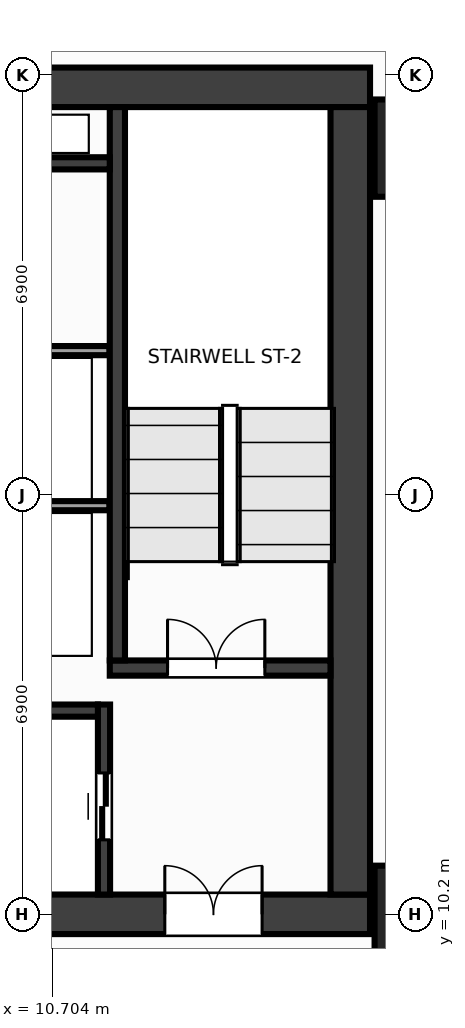
"""IFC4 building model, lengths in metres.
Left out: names, types, materials, properties, quantities, classifications, styles, units other than length and angle.
Written with IfcOpenShell. Run it as: python <this file> out.ifc"""

import sys

from ifc_helpers import new_model, si_unit, direction, frame, frame_2d, origin, origin_2d, place, context, subcontext, project, spatial, rectangle, extrude, source, transform, mapped, element, fill, save


model = new_model("IFC4")
c1 = context("Model", 3, precision=1e-05, world=origin(), true_north=direction((0.0, 1.0)))
c2 = subcontext(c1, "Body", "Model", "MODEL_VIEW")
j1 = project(units=[si_unit("LENGTHUNIT", "METRE"), si_unit("PLANEANGLEUNIT", "RADIAN")], contexts=[c1])
p1 = place(None, origin())
s1 = spatial("IfcSite", under=j1, at=p1, CompositionType="ELEMENT")
p2 = place(p1, origin())
s2 = spatial("IfcBuilding", under=s1, at=p2, CompositionType="ELEMENT")
p3 = place(p2, frame((0.0, 0.0, 142.4)))
s3 = spatial("IfcBuildingStorey", under=s2, at=p3, CompositionType="ELEMENT", Elevation=142.4)
m1 = source(origin(), c2, "Body", "SweptSolid", [
    extrude(rectangle(XDim=31.85, YDim=0.65, at=frame_2d((15.925, 0.0))), origin(), (0.0, 0.0, 1.0), 3.6),
])
p4 = place(p3, frame((-15.925, 23.8, 0.0), z_axis=(0.0, 0.0, 1.0), x_axis=(1.0, 0.0, 0.0)))
e1 = element("IfcWall", 1, at=p4, inside=s3, PredefinedType="SHEAR", context=c2, shape_type="MappedRepresentation", body=[
    mapped(m1, transform((0.0, 0.0, 0.0), x_axis=(1.0, 0.0, 0.0), y_axis=(0.0, 1.0, 0.0), z_axis=(0.0, 0.0, 1.0), scale=1.0)),
])
p5 = place(p3, frame((-15.925, 10.2, 0.0), z_axis=(0.0, 0.0, 1.0), x_axis=(1.0, 0.0, 0.0)))
e2 = element("IfcWall", 2, at=p5, inside=s3, PredefinedType="SHEAR", context=c2, shape_type="MappedRepresentation", body=[
    mapped(m1, transform((0.0, 0.0, 0.0), x_axis=(1.0, 0.0, 0.0), y_axis=(0.0, 1.0, 0.0), z_axis=(0.0, 0.0, 1.0), scale=1.0)),
])
p6 = place(p5, frame((1.775, 0.0, 0.0)))
e3 = element("IfcOpeningElement", 3, at=p6, cuts=e2, PredefinedType="OPENING", context=c2, shape_type="SweptSolid", body=[
    extrude(rectangle(XDim=1.6, YDim=2.15, at=frame_2d((0.8, 1.075))), frame((0.0, 0.337, 0.0), z_axis=(0.0, -1.0, 0.0), x_axis=(1.0, 0.0, 0.0)), (0.0, 0.0, 1.0), 0.674),
])
p7 = place(p5, frame((28.475, 0.0, 0.0)))
e4 = element("IfcOpeningElement", 4, at=p7, cuts=e2, PredefinedType="OPENING", context=c2, shape_type="SweptSolid", body=[
    extrude(rectangle(XDim=1.6, YDim=2.15, at=frame_2d((0.8, 1.075))), frame((0.0, 0.337, 0.0), z_axis=(0.0, -1.0, 0.0), x_axis=(1.0, 0.0, 0.0)), (0.0, 0.0, 1.0), 0.674),
])
p8 = place(p5, frame((15.175, 0.0, 0.0)))
e5 = element("IfcOpeningElement", 5, at=p8, cuts=e2, PredefinedType="OPENING", context=c2, shape_type="SweptSolid", body=[
    extrude(rectangle(XDim=1.5, YDim=2.2, at=frame_2d((0.75, 1.1))), frame((0.0, 0.337, 0.0), z_axis=(0.0, -1.0, 0.0), x_axis=(1.0, 0.0, 0.0)), (0.0, 0.0, 1.0), 0.674),
])
m2 = source(origin(), c2, "Body", "SweptSolid", [
    extrude(rectangle(XDim=12.95, YDim=0.65, at=frame_2d((6.475, 0.0))), origin(), (0.0, 0.0, 1.0), 3.6),
])
p9 = place(p3, frame((15.6, 10.525, 0.0), z_axis=(0.0, 0.0, 1.0), x_axis=(0.0, 1.0, 0.0)))
e6 = element("IfcWall", 6, at=p9, inside=s3, PredefinedType="SHEAR", context=c2, shape_type="MappedRepresentation", body=[
    mapped(m2, transform((0.0, 0.0, 0.0), x_axis=(1.0, 0.0, 0.0), y_axis=(0.0, 1.0, 0.0), z_axis=(0.0, 0.0, 1.0), scale=1.0)),
])
m3 = source(origin(), c2, "Body", "SweptSolid", [
    extrude(rectangle(XDim=3.63, YDim=0.25, at=frame_2d((1.815, 0.0))), origin(), (0.0, 0.0, 1.0), 3.6),
])
p10 = place(p3, frame((11.645, 14.25, 0.0), z_axis=(0.0, 0.0, 1.0), x_axis=(1.0, 0.0, 0.0)))
e7 = element("IfcWall", 7, at=p10, inside=s3, PredefinedType="SHEAR", context=c2, shape_type="MappedRepresentation", body=[
    mapped(m3, transform((0.0, 0.0, 0.0), x_axis=(1.0, 0.0, 0.0), y_axis=(0.0, 1.0, 0.0), z_axis=(0.0, 0.0, 1.0), scale=1.0)),
])
p11 = place(p10, frame((0.95, 0.0, 0.0)))
e8 = element("IfcOpeningElement", 8, at=p11, cuts=e7, PredefinedType="OPENING", context=c2, shape_type="SweptSolid", body=[
    extrude(rectangle(XDim=1.6, YDim=2.15, at=frame_2d((0.8, 1.075))), frame((0.0, 0.137, 0.0), z_axis=(0.0, -1.0, 0.0), x_axis=(1.0, 0.0, 0.0)), (0.0, 0.0, 1.0), 0.274),
])
m4 = source(origin(), c2, "Body", "SweptSolid", [
    extrude(rectangle(XDim=9.1, YDim=0.25, at=frame_2d((4.55, 0.0))), origin(), (0.0, 0.0, 1.0), 3.6),
])
p12 = place(p3, frame((11.77, 14.375, 0.0), z_axis=(0.0, 0.0, 1.0), x_axis=(0.0, 1.0, 0.0)))
e9 = element("IfcWall", 9, at=p12, inside=s3, PredefinedType="SHEAR", context=c2, shape_type="MappedRepresentation", body=[
    mapped(m4, transform((0.0, 0.0, 0.0), x_axis=(1.0, 0.0, 0.0), y_axis=(0.0, 1.0, 0.0), z_axis=(0.0, 0.0, 1.0), scale=1.0)),
])
m5 = source(origin(), c2, "Body", "SweptSolid", [
    extrude(rectangle(XDim=3.125, YDim=0.2, at=frame_2d((1.562, 0.0))), origin(), (0.0, 0.0, 1.0), 3.6),
])
p13 = place(p3, frame((11.55, 10.525, 0.0), z_axis=(0.0, 0.0, 1.0), x_axis=(0.0, 1.0, 0.0)))
e10 = element("IfcWall", 10, at=p13, inside=s3, PredefinedType="SHEAR", context=c2, shape_type="MappedRepresentation", body=[
    mapped(m5, transform((0.0, 0.0, 0.0), x_axis=(1.0, 0.0, 0.0), y_axis=(0.0, 1.0, 0.0), z_axis=(0.0, 0.0, 1.0), scale=1.0)),
])
p14 = place(p13, frame((0.9, 0.0, 0.0)))
e11 = element("IfcOpeningElement", 11, at=p14, cuts=e10, PredefinedType="OPENING", context=c2, shape_type="SweptSolid", body=[
    extrude(rectangle(XDim=1.1, YDim=2.15, at=frame_2d((0.55, 1.075))), frame((0.0, 0.112, 0.0), z_axis=(0.0, -1.0, 0.0), x_axis=(1.0, 0.0, 0.0)), (0.0, 0.0, 1.0), 0.224),
])
m6 = source(origin(), c2, "Body", "SweptSolid", [
    extrude(rectangle(XDim=2.825, YDim=0.2, at=frame_2d((1.413, 0.0))), origin(), (0.0, 0.0, 1.0), 3.6),
])
p15 = place(p3, frame((8.625, 13.55, 0.0), z_axis=(0.0, 0.0, 1.0), x_axis=(1.0, 0.0, 0.0)))
e12 = element("IfcWall", 12, at=p15, inside=s3, PredefinedType="SHEAR", context=c2, shape_type="MappedRepresentation", body=[
    mapped(m6, transform((0.0, 0.0, 0.0), x_axis=(1.0, 0.0, 0.0), y_axis=(0.0, 1.0, 0.0), z_axis=(0.0, 0.0, 1.0), scale=1.0)),
])
m7 = source(origin(), c2, "Body", "SweptSolid", [
    extrude(rectangle(XDim=3.02, YDim=0.2, at=frame_2d((1.51, 0.0))), origin(), (0.0, 0.0, 1.0), 3.6),
])
p16 = place(p3, frame((8.625, 22.55, 0.0), z_axis=(0.0, 0.0, 1.0), x_axis=(1.0, 0.0, 0.0)))
e13 = element("IfcWall", 13, at=p16, inside=s3, PredefinedType="SHEAR", context=c2, shape_type="MappedRepresentation", body=[
    mapped(m7, transform((0.0, 0.0, 0.0), x_axis=(1.0, 0.0, 0.0), y_axis=(0.0, 1.0, 0.0), z_axis=(0.0, 0.0, 1.0), scale=1.0)),
])
m8 = source(origin(), c2, "Body", "SweptSolid", [
    extrude(rectangle(XDim=1.6, YDim=1.6, at=origin_2d()), origin(), (0.0, 0.0, 1.0), 3.6),
])
for number, where, z_axis, x_axis in (
    (14, (16.8, 10.2, 0.0), (0.0, 0.0, 1.0), (1.0, 0.0, 0.0)),
    (15, (16.8, 22.8, 0.0), (0.0, 0.0, 1.0), (1.0, 0.0, 0.0)),
):
    element("IfcColumn", number, at=place(p3, frame(where, z_axis=z_axis, x_axis=x_axis)), inside=s3, PredefinedType="COLUMN", context=c2, shape_type="MappedRepresentation", body=[
        mapped(m8, transform((0.0, 0.0, 0.0), x_axis=(1.0, 0.0, 0.0), y_axis=(0.0, 1.0, 0.0), z_axis=(0.0, 0.0, 1.0), scale=1.0)),
    ])
m9 = source(origin(), c2, "Body", "SweptSolid", [
    extrude(rectangle(XDim=3.01, YDim=0.15, at=frame_2d((1.505, 0.0))), origin(), (0.0, 0.0, 1.0), 3.38),
])
for number, where, z_axis, x_axis in (
    (16, (8.63, 16.92, 0.0), (0.0, 0.0, 1.0), (1.0, 0.0, 0.0)),
    (17, (8.63, 19.47, 0.0), (0.0, 0.0, 1.0), (1.0, 0.0, 0.0)),
):
    element("IfcWall", number, at=place(p3, frame(where, z_axis=z_axis, x_axis=x_axis)), inside=s3, PredefinedType="PARTITIONING", context=c2, shape_type="MappedRepresentation", body=[
        mapped(m9, transform((0.0, 0.0, 0.0), x_axis=(1.0, 0.0, 0.0), y_axis=(0.0, 1.0, 0.0), z_axis=(0.0, 0.0, 1.0), scale=1.0)),
    ])
m10 = source(origin(), c2, "Body", "SweptSolid", [
    extrude(rectangle(XDim=1.6, YDim=2.15, at=frame_2d((0.8, 1.075))), frame((0.0, 0.025, 0.0), z_axis=(0.0, -1.0, 0.0), x_axis=(1.0, 0.0, 0.0)), (0.0, 0.0, 1.0), 0.05),
])
p17 = place(p11, origin())
e18 = element("IfcDoor", 18, at=p17, inside=s3, OperationType="DOUBLE_DOOR_SINGLE_SWING", PredefinedType="DOOR", context=c2, shape_type="MappedRepresentation", body=[
    mapped(m10, transform((0.0, 0.0, 0.0), x_axis=(1.0, 0.0, 0.0), y_axis=(0.0, 1.0, 0.0), z_axis=(0.0, 0.0, 1.0), scale=1.0)),
])
fill(e8, e18)
p18 = place(p7, origin())
e19 = element("IfcDoor", 19, at=p18, inside=s3, OperationType="DOUBLE_DOOR_SINGLE_SWING", PredefinedType="DOOR", context=c2, shape_type="MappedRepresentation", body=[
    mapped(m10, transform((0.0, 0.0, 0.0), x_axis=(1.0, 0.0, 0.0), y_axis=(0.0, 1.0, 0.0), z_axis=(0.0, 0.0, 1.0), scale=1.0)),
])
fill(e4, e19)
m11 = source(origin(), c2, "Body", "SweptSolid", [
    extrude(rectangle(XDim=1.1, YDim=2.15, at=frame_2d((0.55, 1.075))), frame((0.0, 0.025, 0.0), z_axis=(0.0, -1.0, 0.0), x_axis=(1.0, 0.0, 0.0)), (0.0, 0.0, 1.0), 0.05),
])
p19 = place(p14, origin())
e20 = element("IfcDoor", 20, at=p19, inside=s3, OperationType="DOUBLE_DOOR_SLIDING", PredefinedType="DOOR", context=c2, shape_type="MappedRepresentation", body=[
    mapped(m11, transform((0.0, 0.0, 0.0), x_axis=(1.0, 0.0, 0.0), y_axis=(0.0, 1.0, 0.0), z_axis=(0.0, 0.0, 1.0), scale=1.0)),
])
fill(e11, e20)
save(model, sys.argv[1])
